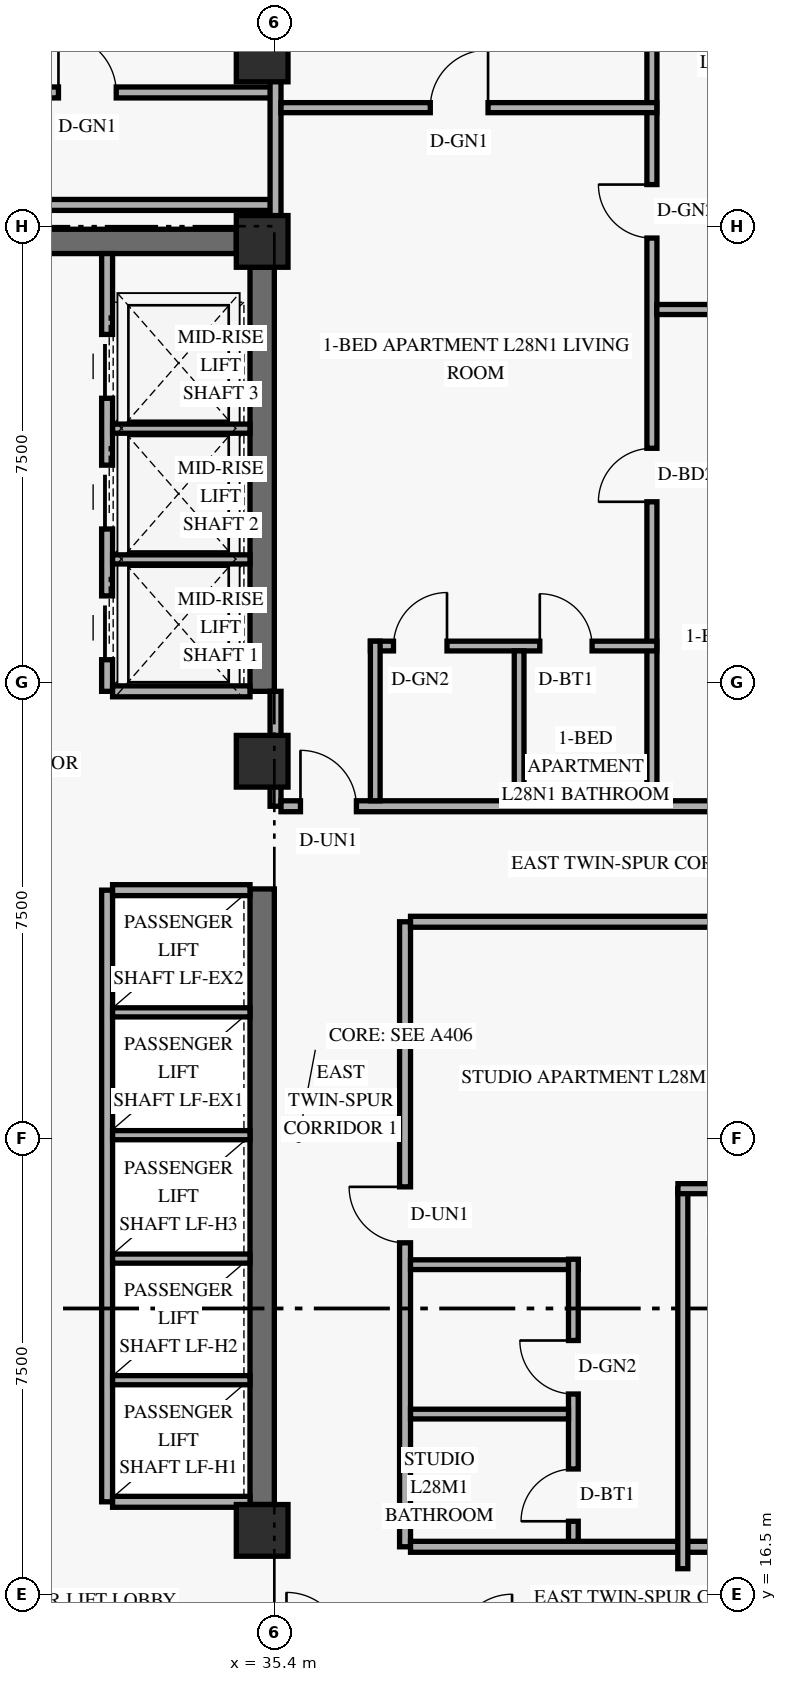
"""IFC4 building model, lengths in metres.
Left out: names, types, materials, properties, quantities, classifications, styles, units other than length and angle.
Written with IfcOpenShell. Run it as: python <this file> out.ifc"""

import sys

from ifc_helpers import new_model, si_unit, direction, frame, frame_2d, origin, origin_2d, place, context, subcontext, project, spatial, rectangle, extrude, element, fill, save


model = new_model("IFC4")
c1 = context("Model", 3, precision=1e-05, world=origin(), true_north=direction((0.0, 1.0)))
c2 = subcontext(c1, "Body", "Model", "MODEL_VIEW")
j1 = project(units=[si_unit("LENGTHUNIT", "METRE"), si_unit("PLANEANGLEUNIT", "RADIAN")], contexts=[c1])
p1 = place(None, origin())
s1 = spatial("IfcSite", under=j1, at=p1, CompositionType="ELEMENT")
p2 = place(p1, origin())
s2 = spatial("IfcBuilding", under=s1, at=p2, CompositionType="ELEMENT")
p3 = place(p2, frame((0.0, 0.0, 109.8)))
s3 = spatial("IfcBuildingStorey", under=s2, at=p3, CompositionType="ELEMENT", Elevation=109.8)
p4 = place(p3, frame((35.2, 17.975, 0.0), z_axis=(0.0, 0.0, 1.0), x_axis=(0.0, 1.0, 0.0)))
e1 = element("IfcWall", 1, at=p4, inside=s3, PredefinedType="SHEAR", context=c2, shape_type="SweptSolid", body=[
    extrude(rectangle(XDim=10.125, YDim=0.4, at=frame_2d((5.062, 0.0))), origin(), (0.0, 0.0, 1.0), 2.749),
])
p5 = place(p3, frame((35.2, 31.35, 0.0), z_axis=(0.0, 0.0, 1.0), x_axis=(0.0, 1.0, 0.0)))
e2 = element("IfcWall", 2, at=p5, inside=s3, PredefinedType="SHEAR", context=c2, shape_type="SweptSolid", body=[
    extrude(rectangle(XDim=6.975, YDim=0.4, at=frame_2d((3.487, 0.0))), origin(), (0.0, 0.0, 1.0), 2.749),
])
p6 = place(p3, frame((24.625, 38.75, 0.0), z_axis=(0.0, 0.0, 1.0), x_axis=(1.0, 0.0, 0.0)))
e3 = element("IfcWall", 3, at=p6, inside=s3, PredefinedType="SHEAR", context=c2, shape_type="SweptSolid", body=[
    extrude(rectangle(XDim=10.15, YDim=0.4, at=frame_2d((5.075, 0.0))), origin(), (0.0, 0.0, 1.0), 3.36),
])
p7 = place(p6, frame((5.2, 0.0, 0.0)))
e4 = element("IfcOpeningElement", 4, at=p7, cuts=e3, PredefinedType="OPENING", context=c2, shape_type="SweptSolid", body=[
    extrude(rectangle(XDim=1.05, YDim=2.15, at=frame_2d((0.525, 1.075))), frame((0.0, 0.21, 0.0), z_axis=(0.0, -1.0, 0.0), x_axis=(1.0, 0.0, 0.0)), (0.0, 0.0, 1.0), 0.42),
])
for number, where, z_axis, x_axis in (
    (5, (35.2, 17.55, 0.0), (0.0, 0.0, 1.0), (1.0, 0.0, 0.0)),
    (6, (35.2, 30.2, 0.0), (0.0, 0.0, 1.0), (1.0, 0.0, 0.0)),
    (7, (35.2, 38.75, 0.0), (0.0, 0.0, 1.0), (1.0, 0.0, 0.0)),
    (8, (35.2, 41.8, 0.0), (0.0, 0.0, 1.0), (1.0, 0.0, 0.0)),
):
    element("IfcColumn", number, at=place(p3, frame(where, z_axis=z_axis, x_axis=x_axis)), inside=s3, PredefinedType="COLUMN", context=c2, shape_type="SweptSolid", body=[
        extrude(rectangle(XDim=0.85, YDim=0.85, at=origin_2d()), origin(), (0.0, 0.0, 1.0), 3.6),
    ])
p8 = place(p3, frame((32.65, 18.02, 0.0), z_axis=(0.0, 0.0, 1.0), x_axis=(0.0, 1.0, 0.0)))
e9 = element("IfcWall", 9, at=p8, inside=s3, PredefinedType="STANDARD", context=c2, shape_type="SweptSolid", body=[
    extrude(rectangle(XDim=10.06, YDim=0.18, at=frame_2d((5.03, 0.0))), origin(), (0.0, 0.0, 1.0), 3.36),
])
for number, where, z_axis, x_axis in (
    (10, (32.74, 18.02, 0.0), (0.0, 0.0, 1.0), (1.0, 0.0, 0.0)),
    (11, (32.74, 28.08, 0.0), (0.0, 0.0, 1.0), (1.0, 0.0, 0.0)),
):
    element("IfcWall", number, at=place(p3, frame(where, z_axis=z_axis, x_axis=x_axis)), inside=s3, PredefinedType="STANDARD", context=c2, shape_type="SweptSolid", body=[
        extrude(rectangle(XDim=2.26, YDim=0.18, at=frame_2d((1.13, 0.0))), origin(), (0.0, 0.0, 1.0), 3.36),
    ])
for number, where, z_axis, x_axis in (
    (12, (32.74, 20.02, 0.0), (0.0, 0.0, 1.0), (1.0, 0.0, 0.0)),
    (13, (32.74, 22.02, 0.0), (0.0, 0.0, 1.0), (1.0, 0.0, 0.0)),
    (14, (32.74, 24.05, 0.0), (0.0, 0.0, 1.0), (1.0, 0.0, 0.0)),
    (15, (32.74, 26.07, 0.0), (0.0, 0.0, 1.0), (1.0, 0.0, 0.0)),
):
    element("IfcWall", number, at=place(p3, frame(where, z_axis=z_axis, x_axis=x_axis)), inside=s3, PredefinedType="STANDARD", context=c2, shape_type="SweptSolid", body=[
        extrude(rectangle(XDim=2.26, YDim=0.15, at=frame_2d((1.13, 0.0))), origin(), (0.0, 0.0, 1.0), 3.36),
    ])
p9 = place(p3, frame((32.65, 31.35, 0.0), z_axis=(0.0, 0.0, 1.0), x_axis=(0.0, 1.0, 0.0)))
e16 = element("IfcWall", 16, at=p9, inside=s3, PredefinedType="STANDARD", context=c2, shape_type="SweptSolid", body=[
    extrude(rectangle(XDim=7.2, YDim=0.18, at=frame_2d((3.6, 0.0))), origin(), (0.0, 0.0, 1.0), 3.36),
])
p10 = place(p9, frame((0.52, 0.0, 0.0)))
e17 = element("IfcOpeningElement", 17, at=p10, cuts=e16, PredefinedType="OPENING", context=c2, shape_type="SweptSolid", body=[
    extrude(rectangle(XDim=1.05, YDim=2.2, at=frame_2d((0.525, 1.1))), frame((0.0, 0.1, 0.0), z_axis=(0.0, -1.0, 0.0), x_axis=(1.0, 0.0, 0.0)), (0.0, 0.0, 1.0), 0.2),
])
p11 = place(p9, frame((2.67, 0.0, 0.0)))
e18 = element("IfcOpeningElement", 18, at=p11, cuts=e16, PredefinedType="OPENING", context=c2, shape_type="SweptSolid", body=[
    extrude(rectangle(XDim=1.05, YDim=2.2, at=frame_2d((0.525, 1.1))), frame((0.0, 0.1, 0.0), z_axis=(0.0, -1.0, 0.0), x_axis=(1.0, 0.0, 0.0)), (0.0, 0.0, 1.0), 0.2),
])
p12 = place(p9, frame((4.82, 0.0, 0.0)))
e19 = element("IfcOpeningElement", 19, at=p12, cuts=e16, PredefinedType="OPENING", context=c2, shape_type="SweptSolid", body=[
    extrude(rectangle(XDim=1.05, YDim=2.2, at=frame_2d((0.525, 1.1))), frame((0.0, 0.1, 0.0), z_axis=(0.0, -1.0, 0.0), x_axis=(1.0, 0.0, 0.0)), (0.0, 0.0, 1.0), 0.2),
])
p13 = place(p3, frame((32.74, 31.35, 0.0), z_axis=(0.0, 0.0, 1.0), x_axis=(1.0, 0.0, 0.0)))
e20 = element("IfcWall", 20, at=p13, inside=s3, PredefinedType="STANDARD", context=c2, shape_type="SweptSolid", body=[
    extrude(rectangle(XDim=2.26, YDim=0.18, at=frame_2d((1.13, 0.0))), origin(), (0.0, 0.0, 1.0), 3.36),
])
for number, where, z_axis, x_axis in (
    (21, (32.74, 33.52, 0.0), (0.0, 0.0, 1.0), (1.0, 0.0, 0.0)),
    (22, (32.74, 35.67, 0.0), (0.0, 0.0, 1.0), (1.0, 0.0, 0.0)),
):
    element("IfcWall", number, at=place(p3, frame(where, z_axis=z_axis, x_axis=x_axis)), inside=s3, PredefinedType="STANDARD", context=c2, shape_type="SweptSolid", body=[
        extrude(rectangle(XDim=2.26, YDim=0.15, at=frame_2d((1.13, 0.0))), origin(), (0.0, 0.0, 1.0), 3.36),
    ])
p14 = place(p3, frame((37.55, 17.28, 0.0), z_axis=(0.0, 0.0, 1.0), x_axis=(0.0, 1.0, 0.0)))
e23 = element("IfcWall", 23, at=p14, inside=s3, PredefinedType="STANDARD", context=c2, shape_type="SweptSolid", body=[
    extrude(rectangle(XDim=10.28, YDim=0.18, at=frame_2d((5.14, 0.0))), origin(), (0.0, 0.0, 1.0), 2.731),
])
p15 = place(p14, frame((5.0, 0.0, 0.0)))
e24 = element("IfcOpeningElement", 24, at=p15, cuts=e23, PredefinedType="OPENING", context=c2, shape_type="SweptSolid", body=[
    extrude(rectangle(XDim=0.92, YDim=2.15, at=frame_2d((0.46, 1.075))), frame((0.0, 0.1, 0.0), z_axis=(0.0, -1.0, 0.0), x_axis=(1.0, 0.0, 0.0)), (0.0, 0.0, 1.0), 0.2),
])
for number, where, z_axis, x_axis in (
    (25, (37.64, 17.28, 0.0), (0.0, 0.0, 1.0), (1.0, 0.0, 0.0)),
    (26, (37.64, 27.56, 0.0), (0.0, 0.0, 1.0), (1.0, 0.0, 0.0)),
):
    element("IfcWall", number, at=place(p3, frame(where, z_axis=z_axis, x_axis=x_axis)), inside=s3, PredefinedType="STANDARD", context=c2, shape_type="SweptSolid", body=[
        extrude(rectangle(XDim=7.96, YDim=0.18, at=frame_2d((3.98, 0.0))), origin(), (0.0, 0.0, 1.0), 2.731),
    ])
p16 = place(p3, frame((35.42, 29.46, 0.0), z_axis=(0.0, 0.0, 1.0), x_axis=(0.0, 1.0, 0.0)))
e27 = element("IfcWall", 27, at=p16, inside=s3, PredefinedType="STANDARD", context=c2, shape_type="SweptSolid", body=[
    extrude(rectangle(XDim=1.89, YDim=0.18, at=frame_2d((0.945, 0.0))), origin(), (0.0, 0.0, 1.0), 2.731),
])
p17 = place(p3, frame((35.51, 29.46, 0.0), z_axis=(0.0, 0.0, 1.0), x_axis=(1.0, 0.0, 0.0)))
e28 = element("IfcWall", 28, at=p17, inside=s3, PredefinedType="STANDARD", context=c2, shape_type="SweptSolid", body=[
    extrude(rectangle(XDim=10.09, YDim=0.18, at=frame_2d((5.045, 0.0))), origin(), (0.0, 0.0, 1.0), 2.731),
])
p18 = place(p17, frame((0.32, 0.0, 0.0)))
e29 = element("IfcOpeningElement", 29, at=p18, cuts=e28, PredefinedType="OPENING", context=c2, shape_type="SweptSolid", body=[
    extrude(rectangle(XDim=0.92, YDim=2.15, at=frame_2d((0.46, 1.075))), frame((0.0, 0.1, 0.0), z_axis=(0.0, -1.0, 0.0), x_axis=(1.0, 0.0, 0.0)), (0.0, 0.0, 1.0), 0.2),
])
p19 = place(p3, frame((21.74, 41.2, 0.0), z_axis=(0.0, 0.0, 1.0), x_axis=(1.0, 0.0, 0.0)))
e30 = element("IfcWall", 30, at=p19, inside=s3, PredefinedType="STANDARD", context=c2, shape_type="SweptSolid", body=[
    extrude(rectangle(XDim=13.68, YDim=0.18, at=frame_2d((6.84, 0.0))), origin(), (0.0, 0.0, 1.0), 2.731),
])
p20 = place(p19, frame((3.09, 0.0, 0.0)))
e31 = element("IfcOpeningElement", 31, at=p20, cuts=e30, PredefinedType="OPENING", context=c2, shape_type="SweptSolid", body=[
    extrude(rectangle(XDim=0.95, YDim=2.15, at=frame_2d((0.475, 1.075))), frame((0.0, 0.1, 0.0), z_axis=(0.0, -1.0, 0.0), x_axis=(1.0, 0.0, 0.0)), (0.0, 0.0, 1.0), 0.2),
])
p21 = place(p19, frame((10.11, 0.0, 0.0)))
e32 = element("IfcOpeningElement", 32, at=p21, cuts=e30, PredefinedType="OPENING", context=c2, shape_type="SweptSolid", body=[
    extrude(rectangle(XDim=0.95, YDim=2.15, at=frame_2d((0.475, 1.075))), frame((0.0, 0.1, 0.0), z_axis=(0.0, -1.0, 0.0), x_axis=(1.0, 0.0, 0.0)), (0.0, 0.0, 1.0), 0.2),
])
p22 = place(p3, frame((23.85, 39.35, 0.0), z_axis=(0.0, 0.0, 1.0), x_axis=(1.0, 0.0, 0.0)))
e33 = element("IfcWall", 33, at=p22, inside=s3, PredefinedType="STANDARD", context=c2, shape_type="SweptSolid", body=[
    extrude(rectangle(XDim=11.57, YDim=0.18, at=frame_2d((5.785, 0.0))), origin(), (0.0, 0.0, 1.0), 2.731),
])
p23 = place(p3, frame((35.42, 38.75, 0.0), z_axis=(0.0, 0.0, 1.0), x_axis=(0.0, 1.0, 0.0)))
e34 = element("IfcWall", 34, at=p23, inside=s3, PredefinedType="PARTITIONING", context=c2, shape_type="SweptSolid", body=[
    extrude(rectangle(XDim=6.27, YDim=0.18, at=frame_2d((3.135, 0.0))), origin(), (0.0, 0.0, 1.0), 2.731),
])
p24 = place(p3, frame((41.61, 29.55, 0.0), z_axis=(0.0, 0.0, 1.0), x_axis=(0.0, 1.0, 0.0)))
e35 = element("IfcWall", 35, at=p24, inside=s3, PredefinedType="PARTITIONING", context=c2, shape_type="SweptSolid", body=[
    extrude(rectangle(XDim=15.47, YDim=0.165, at=frame_2d((7.735, 0.0))), origin(), (0.0, 0.0, 1.0), 2.731),
])
p25 = place(p24, frame((4.917, 0.0, 0.0)))
e36 = element("IfcOpeningElement", 36, at=p25, cuts=e35, PredefinedType="OPENING", context=c2, shape_type="SweptSolid", body=[
    extrude(rectangle(XDim=0.88, YDim=2.14, at=frame_2d((0.44, 1.07))), frame((0.0, 0.093, 0.0), z_axis=(0.0, -1.0, 0.0), x_axis=(1.0, 0.0, 0.0)), (0.0, 0.0, 1.0), 0.185),
])
p26 = place(p24, frame((9.255, 0.0, 0.0)))
e37 = element("IfcOpeningElement", 37, at=p26, cuts=e35, PredefinedType="OPENING", context=c2, shape_type="SweptSolid", body=[
    extrude(rectangle(XDim=0.88, YDim=2.12, at=frame_2d((0.44, 1.06))), frame((0.0, 0.093, 0.0), z_axis=(0.0, -1.0, 0.0), x_axis=(1.0, 0.0, 0.0)), (0.0, 0.0, 1.0), 0.185),
])
p27 = place(p3, frame((36.98, 32.095, 0.0), z_axis=(0.0, 0.0, 1.0), x_axis=(1.0, 0.0, 0.0)))
e38 = element("IfcWall", 38, at=p27, inside=s3, PredefinedType="PLUMBINGWALL", context=c2, shape_type="SweptSolid", body=[
    extrude(rectangle(XDim=4.71, YDim=0.16, at=frame_2d((2.355, 0.0))), origin(), (0.0, 0.0, 1.0), 3.36),
])
p28 = place(p27, frame((0.38, 0.0, 0.0)))
e39 = element("IfcOpeningElement", 39, at=p28, cuts=e38, PredefinedType="OPENING", context=c2, shape_type="SweptSolid", body=[
    extrude(rectangle(XDim=0.88, YDim=2.12, at=frame_2d((0.44, 1.06))), frame((0.0, 0.09, 0.0), z_axis=(0.0, -1.0, 0.0), x_axis=(1.0, 0.0, 0.0)), (0.0, 0.0, 1.0), 0.18),
])
p29 = place(p27, frame((2.786, 0.0, 0.0)))
e40 = element("IfcOpeningElement", 40, at=p29, cuts=e38, PredefinedType="OPENING", context=c2, shape_type="SweptSolid", body=[
    extrude(rectangle(XDim=0.86, YDim=2.12, at=frame_2d((0.43, 1.06))), frame((0.0, 0.09, 0.0), z_axis=(0.0, -1.0, 0.0), x_axis=(1.0, 0.0, 0.0)), (0.0, 0.0, 1.0), 0.18),
])
p30 = place(p3, frame((37.06, 29.55, 0.0), z_axis=(0.0, 0.0, 1.0), x_axis=(0.0, 1.0, 0.0)))
e41 = element("IfcWall", 41, at=p30, inside=s3, PredefinedType="PLUMBINGWALL", context=c2, shape_type="SweptSolid", body=[
    extrude(rectangle(XDim=2.625, YDim=0.16, at=frame_2d((1.312, 0.0))), origin(), (0.0, 0.0, 1.0), 2.731),
])
p31 = place(p3, frame((39.426, 29.55, 0.0), z_axis=(0.0, 0.0, 1.0), x_axis=(0.0, 1.0, 0.0)))
e42 = element("IfcWall", 42, at=p31, inside=s3, PredefinedType="PLUMBINGWALL", context=c2, shape_type="SweptSolid", body=[
    extrude(rectangle(XDim=2.465, YDim=0.16, at=frame_2d((1.232, 0.0))), origin(), (0.0, 0.0, 1.0), 2.731),
])
p32 = place(p3, frame((35.51, 40.95, 0.0), z_axis=(0.0, 0.0, 1.0), x_axis=(1.0, 0.0, 0.0)))
e43 = element("IfcWall", 43, at=p32, inside=s3, PredefinedType="PARTITIONING", context=c2, shape_type="SweptSolid", body=[
    extrude(rectangle(XDim=6.18, YDim=0.165, at=frame_2d((3.09, 0.0))), origin(), (0.0, 0.0, 1.0), 3.36),
])
p33 = place(p32, frame((2.455, 0.0, 0.0)))
e44 = element("IfcOpeningElement", 44, at=p33, cuts=e43, PredefinedType="OPENING", context=c2, shape_type="SweptSolid", body=[
    extrude(rectangle(XDim=0.95, YDim=2.15, at=frame_2d((0.475, 1.075))), frame((0.0, 0.093, 0.0), z_axis=(0.0, -1.0, 0.0), x_axis=(1.0, 0.0, 0.0)), (0.0, 0.0, 1.0), 0.185),
])
p34 = place(p3, frame((41.69, 37.63, 0.0), z_axis=(0.0, 0.0, 1.0), x_axis=(1.0, 0.0, 0.0)))
e45 = element("IfcWall", 45, at=p34, inside=s3, PredefinedType="PARTITIONING", context=c2, shape_type="SweptSolid", body=[
    extrude(rectangle(XDim=3.82, YDim=0.165, at=frame_2d((1.91, 0.0))), origin(), (0.0, 0.0, 1.0), 2.731),
])
p35 = place(p3, frame((37.64, 21.92, 0.0), z_axis=(0.0, 0.0, 1.0), x_axis=(1.0, 0.0, 0.0)))
e46 = element("IfcWall", 46, at=p35, inside=s3, PredefinedType="PLUMBINGWALL", context=c2, shape_type="SweptSolid", body=[
    extrude(rectangle(XDim=2.758, YDim=0.16, at=frame_2d((1.379, 0.0))), origin(), (0.0, 0.0, 1.0), 2.731),
])
p36 = place(p3, frame((40.318, 17.37, 0.0), z_axis=(0.0, 0.0, 1.0), x_axis=(0.0, 1.0, 0.0)))
e47 = element("IfcWall", 47, at=p36, inside=s3, PredefinedType="PLUMBINGWALL", context=c2, shape_type="SweptSolid", body=[
    extrude(rectangle(XDim=4.64, YDim=0.16, at=frame_2d((2.32, 0.0))), origin(), (0.0, 0.0, 1.0), 2.731),
])
p37 = place(p36, frame((0.33, 0.0, 0.0)))
e48 = element("IfcOpeningElement", 48, at=p37, cuts=e47, PredefinedType="OPENING", context=c2, shape_type="SweptSolid", body=[
    extrude(rectangle(XDim=0.86, YDim=2.12, at=frame_2d((0.43, 1.06))), frame((0.0, 0.09, 0.0), z_axis=(0.0, -1.0, 0.0), x_axis=(1.0, 0.0, 0.0)), (0.0, 0.0, 1.0), 0.18),
])
p38 = place(p36, frame((2.423, 0.0, 0.0)))
e49 = element("IfcOpeningElement", 49, at=p38, cuts=e47, PredefinedType="OPENING", context=c2, shape_type="SweptSolid", body=[
    extrude(rectangle(XDim=0.88, YDim=2.12, at=frame_2d((0.44, 1.06))), frame((0.0, 0.09, 0.0), z_axis=(0.0, -1.0, 0.0), x_axis=(1.0, 0.0, 0.0)), (0.0, 0.0, 1.0), 0.18),
])
p39 = place(p3, frame((37.64, 19.463, 0.0), z_axis=(0.0, 0.0, 1.0), x_axis=(1.0, 0.0, 0.0)))
e50 = element("IfcWall", 50, at=p39, inside=s3, PredefinedType="PLUMBINGWALL", context=c2, shape_type="SweptSolid", body=[
    extrude(rectangle(XDim=2.598, YDim=0.16, at=frame_2d((1.299, 0.0))), origin(), (0.0, 0.0, 1.0), 2.731),
])
p40 = place(p3, frame((42.118, 16.92, 0.0), z_axis=(0.0, 0.0, 1.0), x_axis=(0.0, 1.0, 0.0)))
e51 = element("IfcWall", 51, at=p40, inside=s3, PredefinedType="PARTITIONING", context=c2, shape_type="SweptSolid", body=[
    extrude(rectangle(XDim=6.25, YDim=0.165, at=frame_2d((3.125, 0.0))), origin(), (0.0, 0.0, 1.0), 2.731),
])
p41 = place(p3, frame((42.038, 23.17, 0.0), z_axis=(0.0, 0.0, 1.0), x_axis=(1.0, 0.0, 0.0)))
e52 = element("IfcWall", 52, at=p41, inside=s3, PredefinedType="PARTITIONING", context=c2, shape_type="SweptSolid", body=[
    extrude(rectangle(XDim=3.922, YDim=0.165, at=frame_2d((1.961, 0.0))), origin(), (0.0, 0.0, 1.0), 2.731),
])
p42 = place(p41, frame((0.55, 0.0, 0.0)))
e53 = element("IfcOpeningElement", 53, at=p42, cuts=e52, PredefinedType="OPENING", context=c2, shape_type="SweptSolid", body=[
    extrude(rectangle(XDim=0.88, YDim=2.12, at=frame_2d((0.44, 1.06))), frame((0.0, 0.093, 0.0), z_axis=(0.0, -1.0, 0.0), x_axis=(1.0, 0.0, 0.0)), (0.0, 0.0, 1.0), 0.185),
])
p43 = place(p10, origin())
e54 = element("IfcDoor", 54, at=p43, inside=s3, OperationType="SLIDING_TO_LEFT", PredefinedType="DOOR", context=c2, shape_type="SweptSolid", body=[
    extrude(rectangle(XDim=1.05, YDim=2.2, at=frame_2d((0.525, 1.1))), frame((0.0, 0.025, 0.0), z_axis=(0.0, -1.0, 0.0), x_axis=(1.0, 0.0, 0.0)), (0.0, 0.0, 1.0), 0.05),
])
fill(e17, e54)
p44 = place(p11, origin())
e55 = element("IfcDoor", 55, at=p44, inside=s3, OperationType="SLIDING_TO_LEFT", PredefinedType="DOOR", context=c2, shape_type="SweptSolid", body=[
    extrude(rectangle(XDim=1.05, YDim=2.2, at=frame_2d((0.525, 1.1))), frame((0.0, 0.025, 0.0), z_axis=(0.0, -1.0, 0.0), x_axis=(1.0, 0.0, 0.0)), (0.0, 0.0, 1.0), 0.05),
])
fill(e18, e55)
p45 = place(p12, origin())
e56 = element("IfcDoor", 56, at=p45, inside=s3, OperationType="SLIDING_TO_LEFT", PredefinedType="DOOR", context=c2, shape_type="SweptSolid", body=[
    extrude(rectangle(XDim=1.05, YDim=2.2, at=frame_2d((0.525, 1.1))), frame((0.0, 0.025, 0.0), z_axis=(0.0, -1.0, 0.0), x_axis=(1.0, 0.0, 0.0)), (0.0, 0.0, 1.0), 0.05),
])
fill(e19, e56)
p46 = place(p33, origin())
e57 = element("IfcDoor", 57, at=p46, inside=s3, OperationType="SINGLE_SWING_RIGHT", PredefinedType="DOOR", context=c2, shape_type="SweptSolid", body=[
    extrude(rectangle(XDim=0.95, YDim=2.15, at=frame_2d((0.475, 1.075))), frame((0.0, 0.025, 0.0), z_axis=(0.0, -1.0, 0.0), x_axis=(1.0, 0.0, 0.0)), (0.0, 0.0, 1.0), 0.05),
])
fill(e44, e57)
p47 = place(p18, origin())
e58 = element("IfcDoor", 58, at=p47, inside=s3, OperationType="SINGLE_SWING_LEFT", PredefinedType="DOOR", context=c2, shape_type="SweptSolid", body=[
    extrude(rectangle(XDim=0.92, YDim=2.15, at=frame_2d((0.46, 1.075))), frame((0.0, 0.025, 0.0), z_axis=(0.0, -1.0, 0.0), x_axis=(1.0, 0.0, 0.0)), (0.0, 0.0, 1.0), 0.05),
])
fill(e29, e58)
p48 = place(p28, origin())
e59 = element("IfcDoor", 59, at=p48, inside=s3, OperationType="SINGLE_SWING_RIGHT", PredefinedType="DOOR", context=c2, shape_type="SweptSolid", body=[
    extrude(rectangle(XDim=0.88, YDim=2.12, at=frame_2d((0.44, 1.06))), frame((0.0, 0.025, 0.0), z_axis=(0.0, -1.0, 0.0), x_axis=(1.0, 0.0, 0.0)), (0.0, 0.0, 1.0), 0.05),
])
fill(e39, e59)
p49 = place(p29, origin())
e60 = element("IfcDoor", 60, at=p49, inside=s3, OperationType="SINGLE_SWING_LEFT", PredefinedType="DOOR", context=c2, shape_type="SweptSolid", body=[
    extrude(rectangle(XDim=0.86, YDim=2.12, at=frame_2d((0.43, 1.06))), frame((0.0, 0.025, 0.0), z_axis=(0.0, -1.0, 0.0), x_axis=(1.0, 0.0, 0.0)), (0.0, 0.0, 1.0), 0.05),
])
fill(e40, e60)
p50 = place(p25, origin())
e61 = element("IfcDoor", 61, at=p50, inside=s3, OperationType="SINGLE_SWING_LEFT", PredefinedType="DOOR", context=c2, shape_type="SweptSolid", body=[
    extrude(rectangle(XDim=0.88, YDim=2.14, at=frame_2d((0.44, 1.07))), frame((0.0, 0.025, 0.0), z_axis=(0.0, -1.0, 0.0), x_axis=(1.0, 0.0, 0.0)), (0.0, 0.0, 1.0), 0.05),
])
fill(e36, e61)
p51 = place(p26, origin())
e62 = element("IfcDoor", 62, at=p51, inside=s3, OperationType="SINGLE_SWING_RIGHT", PredefinedType="DOOR", context=c2, shape_type="SweptSolid", body=[
    extrude(rectangle(XDim=0.88, YDim=2.12, at=frame_2d((0.44, 1.06))), frame((0.0, 0.025, 0.0), z_axis=(0.0, -1.0, 0.0), x_axis=(1.0, 0.0, 0.0)), (0.0, 0.0, 1.0), 0.05),
])
fill(e37, e62)
p52 = place(p15, origin())
e63 = element("IfcDoor", 63, at=p52, inside=s3, OperationType="SINGLE_SWING_RIGHT", PredefinedType="DOOR", context=c2, shape_type="SweptSolid", body=[
    extrude(rectangle(XDim=0.92, YDim=2.15, at=frame_2d((0.46, 1.075))), frame((0.0, 0.025, 0.0), z_axis=(0.0, -1.0, 0.0), x_axis=(1.0, 0.0, 0.0)), (0.0, 0.0, 1.0), 0.05),
])
fill(e24, e63)
p53 = place(p37, origin())
e64 = element("IfcDoor", 64, at=p53, inside=s3, OperationType="SINGLE_SWING_LEFT", PredefinedType="DOOR", context=c2, shape_type="SweptSolid", body=[
    extrude(rectangle(XDim=0.86, YDim=2.12, at=frame_2d((0.43, 1.06))), frame((0.0, 0.025, 0.0), z_axis=(0.0, -1.0, 0.0), x_axis=(1.0, 0.0, 0.0)), (0.0, 0.0, 1.0), 0.05),
])
fill(e48, e64)
p54 = place(p38, origin())
e65 = element("IfcDoor", 65, at=p54, inside=s3, OperationType="SINGLE_SWING_RIGHT", PredefinedType="DOOR", context=c2, shape_type="SweptSolid", body=[
    extrude(rectangle(XDim=0.88, YDim=2.12, at=frame_2d((0.44, 1.06))), frame((0.0, 0.025, 0.0), z_axis=(0.0, -1.0, 0.0), x_axis=(1.0, 0.0, 0.0)), (0.0, 0.0, 1.0), 0.05),
])
fill(e49, e65)
p55 = place(p21, origin())
e66 = element("IfcDoor", 66, at=p55, inside=s3, OperationType="SINGLE_SWING_LEFT", PredefinedType="DOOR", context=c2, shape_type="SweptSolid", body=[
    extrude(rectangle(XDim=0.95, YDim=2.15, at=frame_2d((0.475, 1.075))), frame((0.0, 0.025, 0.0), z_axis=(0.0, -1.0, 0.0), x_axis=(1.0, 0.0, 0.0)), (0.0, 0.0, 1.0), 0.05),
])
fill(e32, e66)
save(model, sys.argv[1])
